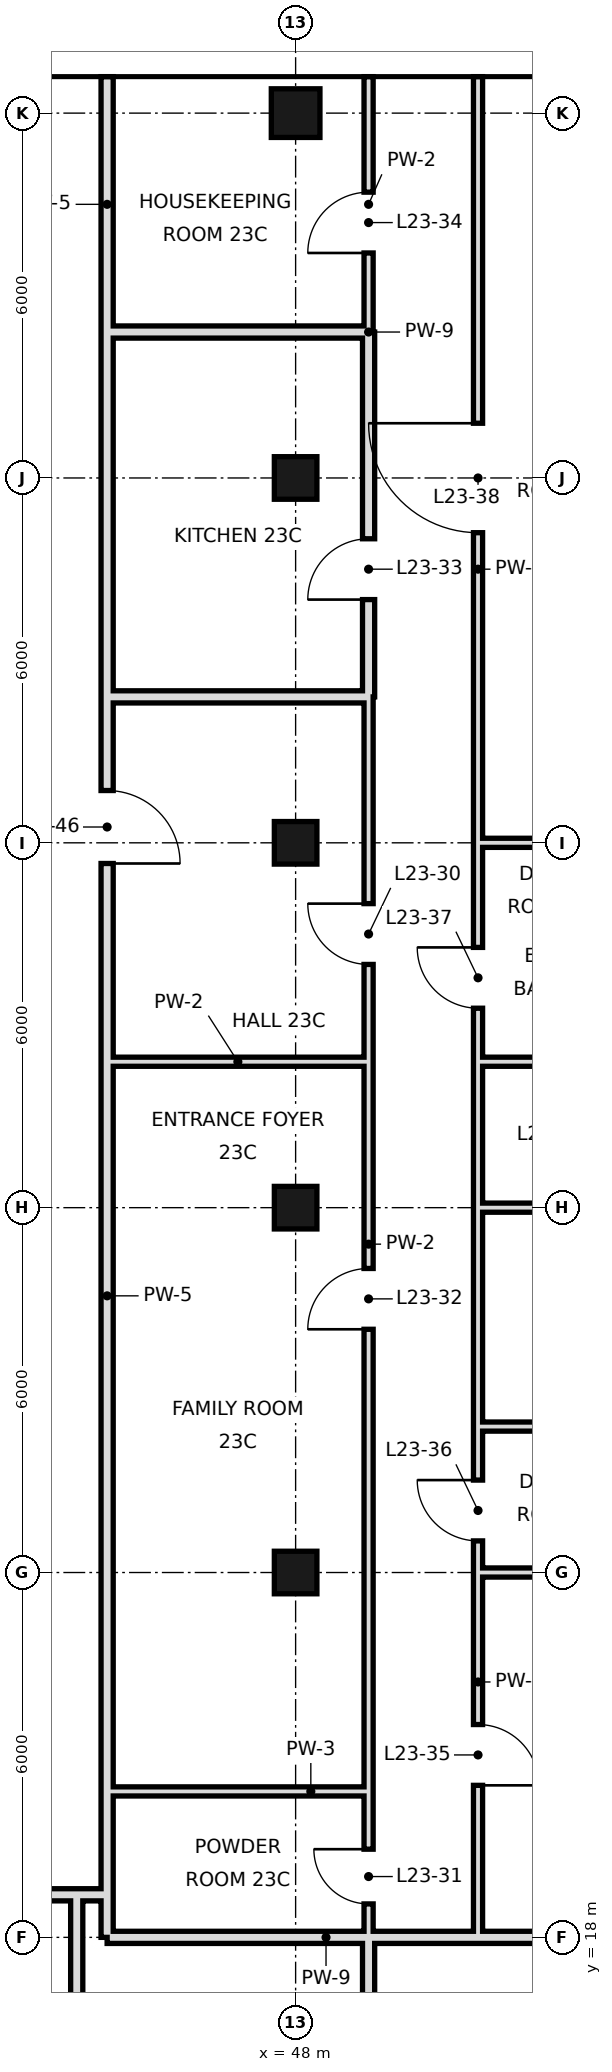
"""IFC4 building model, lengths in metres.
Left out: names, types, materials, properties, quantities, classifications, styles, units other than length and angle.
Written with IfcOpenShell. Run it as: python <this file> out.ifc"""

import sys

from ifc_helpers import new_model, si_unit, direction, frame, frame_2d, origin, origin_2d, place, context, subcontext, project, spatial, rectangle, hollow_rectangle, extrude, element, fill, save


model = new_model("IFC4")
c1 = context("Model", 3, precision=1e-05, world=origin(), true_north=direction((0.0, 1.0)))
c2 = subcontext(c1, "Body", "Model", "MODEL_VIEW")
j1 = project(units=[si_unit("LENGTHUNIT", "METRE"), si_unit("PLANEANGLEUNIT", "RADIAN")], contexts=[c1])
p1 = place(None, origin())
s1 = spatial("IfcSite", under=j1, at=p1, CompositionType="ELEMENT")
p2 = place(p1, origin())
s2 = spatial("IfcBuilding", under=s1, at=p2, CompositionType="ELEMENT")
p3 = place(p2, frame((0.0, 0.0, 107.0)))
s3 = spatial("IfcBuildingStorey", under=s2, at=p3, CompositionType="ELEMENT", Elevation=107.0)
for number, where, z_axis, x_axis in (
    (1, (48.0, 24.0, 0.0), (0.0, 0.0, 1.0), (1.0, 0.0, 0.0)),
    (2, (48.0, 30.0, 0.0), (0.0, 0.0, 1.0), (1.0, 0.0, 0.0)),
    (3, (48.0, 36.0, 0.0), (0.0, 0.0, 1.0), (1.0, 0.0, 0.0)),
    (4, (48.0, 42.0, 0.0), (0.0, 0.0, 1.0), (1.0, 0.0, 0.0)),
):
    element("IfcColumn", number, at=place(p3, frame(where, z_axis=z_axis, x_axis=x_axis)), inside=s3, PredefinedType="COLUMN", context=c2, shape_type="SweptSolid", body=[
        extrude(hollow_rectangle(XDim=0.7, YDim=0.7, WallThickness=0.036, at=origin_2d()), origin(), (0.0, 0.0, 1.0), 3.6),
    ])
p4 = place(p3, frame((48.0, 48.0, 0.0), z_axis=(0.0, 0.0, 1.0), x_axis=(1.0, 0.0, 0.0)))
e5 = element("IfcColumn", 5, at=p4, inside=s3, PredefinedType="COLUMN", context=c2, shape_type="SweptSolid", body=[
    extrude(hollow_rectangle(XDim=0.8, YDim=0.8, WallThickness=0.04, at=origin_2d()), origin(), (0.0, 0.0, 1.0), 3.6),
])
p5 = place(p3, frame((44.4, 10.8, 0.0), z_axis=(0.0, 0.0, 1.0), x_axis=(0.0, 1.0, 0.0)))
e6 = element("IfcWall", 6, at=p5, inside=s3, PredefinedType="SOLIDWALL", context=c2, shape_type="SweptSolid", body=[
    extrude(rectangle(XDim=7.9, YDim=0.2, at=frame_2d((3.95, 0.0))), origin(), (0.0, 0.0, 1.0), 2.72),
])
p6 = place(p3, frame((44.9, 18.7, 0.0), z_axis=(0.0, 0.0, 1.0), x_axis=(0.0, 1.0, 0.0)))
e7 = element("IfcWall", 7, at=p6, inside=s3, PredefinedType="SOLIDWALL", context=c2, shape_type="SweptSolid", body=[
    extrude(rectangle(XDim=19.7, YDim=0.2, at=frame_2d((9.85, 0.0))), origin(), (0.0, 0.0, 1.0), 2.97),
])
p7 = place(p6, frame((16.96, 0.0, 0.0)))
e8 = element("IfcOpeningElement", 8, at=p7, cuts=e7, PredefinedType="OPENING", context=c2, shape_type="SweptSolid", body=[
    extrude(rectangle(XDim=1.2, YDim=2.4, at=frame_2d((0.6, 1.2))), frame((0.0, 0.11, 0.0), z_axis=(0.0, -1.0, 0.0), x_axis=(1.0, 0.0, 0.0)), (0.0, 0.0, 1.0), 0.22),
])
p8 = place(p3, frame((44.9, 44.4, 0.0), z_axis=(0.0, 0.0, 1.0), x_axis=(0.0, 1.0, 0.0)))
e9 = element("IfcWall", 9, at=p8, inside=s3, PredefinedType="SOLIDWALL", context=c2, shape_type="SweptSolid", body=[
    extrude(rectangle(XDim=4.2, YDim=0.2, at=frame_2d((2.1, 0.0))), origin(), (0.0, 0.0, 1.0), 2.72),
])
p9 = place(p3, frame((44.9, 18.0, 0.0), z_axis=(0.0, 0.0, 1.0), x_axis=(0.0, 1.0, 0.0)))
e10 = element("IfcWall", 10, at=p9, inside=s3, PredefinedType="SOLIDWALL", context=c2, shape_type="SweptSolid", body=[
    extrude(rectangle(XDim=0.7, YDim=0.2, at=frame_2d((0.35, 0.0))), origin(), (0.0, 0.0, 1.0), 2.97),
])
p10 = place(p3, frame((44.9, 38.4, 0.0), z_axis=(0.0, 0.0, 1.0), x_axis=(0.0, 1.0, 0.0)))
e11 = element("IfcWall", 11, at=p10, inside=s3, PredefinedType="SOLIDWALL", context=c2, shape_type="SweptSolid", body=[
    extrude(rectangle(XDim=6.0, YDim=0.2, at=frame_2d((3.0, 0.0))), origin(), (0.0, 0.0, 1.0), 2.97),
])
p11 = place(p3, frame((49.2, 10.8, 0.0), z_axis=(0.0, 0.0, 1.0), x_axis=(0.0, 1.0, 0.0)))
e12 = element("IfcWall", 12, at=p11, inside=s3, PredefinedType="SOLIDWALL", context=c2, shape_type="SweptSolid", body=[
    extrude(rectangle(XDim=7.2, YDim=0.2, at=frame_2d((3.6, 0.0))), origin(), (0.0, 0.0, 1.0), 2.72),
])
p12 = place(p3, frame((49.2, 38.4, 0.0), z_axis=(0.0, 0.0, 1.0), x_axis=(0.0, 1.0, 0.0)))
e13 = element("IfcWall", 13, at=p12, inside=s3, PredefinedType="SOLIDWALL", context=c2, shape_type="SweptSolid", body=[
    extrude(rectangle(XDim=6.0, YDim=0.2, at=frame_2d((3.0, 0.0))), origin(), (0.0, 0.0, 1.0), 2.72),
])
p13 = place(p12, frame((1.6, 0.0, 0.0)))
e14 = element("IfcOpeningElement", 14, at=p13, cuts=e13, PredefinedType="OPENING", context=c2, shape_type="SweptSolid", body=[
    extrude(rectangle(XDim=1.0, YDim=2.4, at=frame_2d((0.5, 1.2))), frame((0.0, 0.11, 0.0), z_axis=(0.0, -1.0, 0.0), x_axis=(1.0, 0.0, 0.0)), (0.0, 0.0, 1.0), 0.22),
])
p14 = place(p3, frame((49.2, 20.4, 0.0), z_axis=(0.0, 0.0, 1.0), x_axis=(0.0, 1.0, 0.0)))
e15 = element("IfcWall", 15, at=p14, inside=s3, PredefinedType="PARTITIONING", context=c2, shape_type="SweptSolid", body=[
    extrude(rectangle(XDim=18.0, YDim=0.15, at=frame_2d((9.0, 0.0))), origin(), (0.0, 0.0, 1.0), 3.42),
])
p15 = place(p14, frame((13.6, 0.0, 0.0)))
e16 = element("IfcOpeningElement", 16, at=p15, cuts=e15, PredefinedType="OPENING", context=c2, shape_type="SweptSolid", body=[
    extrude(rectangle(XDim=1.0, YDim=2.4, at=frame_2d((0.5, 1.2))), frame((0.0, 0.085, 0.0), z_axis=(0.0, -1.0, 0.0), x_axis=(1.0, 0.0, 0.0)), (0.0, 0.0, 1.0), 0.17),
])
p16 = place(p14, frame((7.6, 0.0, 0.0)))
e17 = element("IfcOpeningElement", 17, at=p16, cuts=e15, PredefinedType="OPENING", context=c2, shape_type="SweptSolid", body=[
    extrude(rectangle(XDim=1.0, YDim=2.4, at=frame_2d((0.5, 1.2))), frame((0.0, 0.085, 0.0), z_axis=(0.0, -1.0, 0.0), x_axis=(1.0, 0.0, 0.0)), (0.0, 0.0, 1.0), 0.17),
])
p17 = place(p3, frame((49.2, 44.4, 0.0), z_axis=(0.0, 0.0, 1.0), x_axis=(0.0, 1.0, 0.0)))
e18 = element("IfcWall", 18, at=p17, inside=s3, PredefinedType="PARTITIONING", context=c2, shape_type="SweptSolid", body=[
    extrude(rectangle(XDim=4.2, YDim=0.15, at=frame_2d((2.1, 0.0))), origin(), (0.0, 0.0, 1.0), 3.42),
])
p18 = place(p17, frame((1.3, 0.0, 0.0)))
e19 = element("IfcOpeningElement", 19, at=p18, cuts=e18, PredefinedType="OPENING", context=c2, shape_type="SweptSolid", body=[
    extrude(rectangle(XDim=1.0, YDim=2.4, at=frame_2d((0.5, 1.2))), frame((0.0, 0.085, 0.0), z_axis=(0.0, -1.0, 0.0), x_axis=(1.0, 0.0, 0.0)), (0.0, 0.0, 1.0), 0.17),
])
p19 = place(p3, frame((49.2, 18.0, 0.0), z_axis=(0.0, 0.0, 1.0), x_axis=(0.0, 1.0, 0.0)))
e20 = element("IfcWall", 20, at=p19, inside=s3, PredefinedType="PARTITIONING", context=c2, shape_type="SweptSolid", body=[
    extrude(rectangle(XDim=2.4, YDim=0.15, at=frame_2d((1.2, 0.0))), origin(), (0.0, 0.0, 1.0), 3.42),
])
p20 = place(p19, frame((0.55, 0.0, 0.0)))
e21 = element("IfcOpeningElement", 21, at=p20, cuts=e20, PredefinedType="OPENING", context=c2, shape_type="SweptSolid", body=[
    extrude(rectangle(XDim=0.9, YDim=2.4, at=frame_2d((0.45, 1.2))), frame((0.0, 0.085, 0.0), z_axis=(0.0, -1.0, 0.0), x_axis=(1.0, 0.0, 0.0)), (0.0, 0.0, 1.0), 0.17),
])
p21 = place(p3, frame((51.0, 18.0, 0.0), z_axis=(0.0, 0.0, 1.0), x_axis=(0.0, 1.0, 0.0)))
e22 = element("IfcWall", 22, at=p21, inside=s3, PredefinedType="PARTITIONING", context=c2, shape_type="SweptSolid", body=[
    extrude(rectangle(XDim=8.4, YDim=0.15, at=frame_2d((4.2, 0.0))), origin(), (0.0, 0.0, 1.0), 3.42),
])
p22 = place(p21, frame((2.5, 0.0, 0.0)))
e23 = element("IfcOpeningElement", 23, at=p22, cuts=e22, PredefinedType="OPENING", context=c2, shape_type="SweptSolid", body=[
    extrude(rectangle(XDim=1.0, YDim=2.4, at=frame_2d((0.5, 1.2))), frame((0.0, 0.085, 0.0), z_axis=(0.0, -1.0, 0.0), x_axis=(1.0, 0.0, 0.0)), (0.0, 0.0, 1.0), 0.17),
])
p23 = place(p21, frame((6.52, 0.0, 0.0)))
e24 = element("IfcOpeningElement", 24, at=p23, cuts=e22, PredefinedType="OPENING", context=c2, shape_type="SweptSolid", body=[
    extrude(rectangle(XDim=1.0, YDim=2.4, at=frame_2d((0.5, 1.2))), frame((0.0, 0.085, 0.0), z_axis=(0.0, -1.0, 0.0), x_axis=(1.0, 0.0, 0.0)), (0.0, 0.0, 1.0), 0.17),
])
p24 = place(p3, frame((51.0, 32.4, 0.0), z_axis=(0.0, 0.0, 1.0), x_axis=(0.0, 1.0, 0.0)))
e25 = element("IfcWall", 25, at=p24, inside=s3, PredefinedType="PARTITIONING", context=c2, shape_type="SweptSolid", body=[
    extrude(rectangle(XDim=16.2, YDim=0.15, at=frame_2d((8.1, 0.0))), origin(), (0.0, 0.0, 1.0), 3.42),
])
p25 = place(p24, frame((0.88, 0.0, 0.0)))
e26 = element("IfcOpeningElement", 26, at=p25, cuts=e25, PredefinedType="OPENING", context=c2, shape_type="SweptSolid", body=[
    extrude(rectangle(XDim=1.0, YDim=2.4, at=frame_2d((0.5, 1.2))), frame((0.0, 0.085, 0.0), z_axis=(0.0, -1.0, 0.0), x_axis=(1.0, 0.0, 0.0)), (0.0, 0.0, 1.0), 0.17),
])
p26 = place(p24, frame((8.7, 0.0, 0.0)))
e27 = element("IfcOpeningElement", 27, at=p26, cuts=e25, PredefinedType="OPENING", context=c2, shape_type="SweptSolid", body=[
    extrude(rectangle(XDim=1.8, YDim=2.4, at=frame_2d((0.9, 1.2))), frame((0.0, 0.085, 0.0), z_axis=(0.0, -1.0, 0.0), x_axis=(1.0, 0.0, 0.0)), (0.0, 0.0, 1.0), 0.17),
])
p27 = place(p3, frame((51.0, 26.4, 0.0), z_axis=(0.0, 0.0, 1.0), x_axis=(0.0, 1.0, 0.0)))
e28 = element("IfcWall", 28, at=p27, inside=s3, PredefinedType="PARTITIONING", context=c2, shape_type="SweptSolid", body=[
    extrude(rectangle(XDim=6.0, YDim=0.15, at=frame_2d((3.0, 0.0))), origin(), (0.0, 0.0, 1.0), 3.42),
])
p28 = place(p3, frame((44.9, 18.0, 0.0), z_axis=(0.0, 0.0, 1.0), x_axis=(1.0, 0.0, 0.0)))
e29 = element("IfcWall", 29, at=p28, inside=s3, PredefinedType="SOLIDWALL", context=c2, shape_type="SweptSolid", body=[
    extrude(rectangle(XDim=4.3, YDim=0.2, at=frame_2d((2.15, 0.0))), origin(), (0.0, 0.0, 1.0), 2.72),
])
p29 = place(p3, frame((49.2, 18.0, 0.0), z_axis=(0.0, 0.0, 1.0), x_axis=(1.0, 0.0, 0.0)))
e30 = element("IfcWall", 30, at=p29, inside=s3, PredefinedType="SOLIDWALL", context=c2, shape_type="SweptSolid", body=[
    extrude(rectangle(XDim=11.4, YDim=0.2, at=frame_2d((5.7, 0.0))), origin(), (0.0, 0.0, 1.0), 2.72),
])
p30 = place(p3, frame((21.6, 18.7, 0.0), z_axis=(0.0, 0.0, 1.0), x_axis=(1.0, 0.0, 0.0)))
e31 = element("IfcWall", 31, at=p30, inside=s3, PredefinedType="SOLIDWALL", context=c2, shape_type="SweptSolid", body=[
    extrude(rectangle(XDim=22.8, YDim=0.2, at=frame_2d((11.4, 0.0))), origin(), (0.0, 0.0, 1.0), 2.72),
])
p31 = place(p30, frame((4.8, 0.0, 0.0)))
e32 = element("IfcOpeningElement", 32, at=p31, cuts=e31, PredefinedType="OPENING", context=c2, shape_type="SweptSolid", body=[
    extrude(rectangle(XDim=1.2, YDim=2.4, at=frame_2d((0.6, 1.2))), frame((0.0, 0.11, 0.0), z_axis=(0.0, -1.0, 0.0), x_axis=(1.0, 0.0, 0.0)), (0.0, 0.0, 1.0), 0.22),
])
p32 = place(p30, frame((16.8, 0.0, 0.0)))
e33 = element("IfcOpeningElement", 33, at=p32, cuts=e31, PredefinedType="OPENING", context=c2, shape_type="SweptSolid", body=[
    extrude(rectangle(XDim=1.2, YDim=2.4, at=frame_2d((0.6, 1.2))), frame((0.0, 0.11, 0.0), z_axis=(0.0, -1.0, 0.0), x_axis=(1.0, 0.0, 0.0)), (0.0, 0.0, 1.0), 0.22),
])
p33 = place(p3, frame((44.4, 18.7, 0.0), z_axis=(0.0, 0.0, 1.0), x_axis=(1.0, 0.0, 0.0)))
e34 = element("IfcWall", 34, at=p33, inside=s3, PredefinedType="SOLIDWALL", context=c2, shape_type="SweptSolid", body=[
    extrude(rectangle(XDim=0.5, YDim=0.2, at=frame_2d((0.25, 0.0))), origin(), (0.0, 0.0, 1.0), 3.42),
])
p34 = place(p3, frame((44.9, 20.4, 0.0), z_axis=(0.0, 0.0, 1.0), x_axis=(1.0, 0.0, 0.0)))
e35 = element("IfcWall", 35, at=p34, inside=s3, PredefinedType="PARTITIONING", context=c2, shape_type="SweptSolid", body=[
    extrude(rectangle(XDim=4.3, YDim=0.15, at=frame_2d((2.15, 0.0))), origin(), (0.0, 0.0, 1.0), 3.42),
])
p35 = place(p3, frame((51.0, 24.0, 0.0), z_axis=(0.0, 0.0, 1.0), x_axis=(1.0, 0.0, 0.0)))
e36 = element("IfcWall", 36, at=p35, inside=s3, PredefinedType="PARTITIONING", context=c2, shape_type="SweptSolid", body=[
    extrude(rectangle(XDim=9.0, YDim=0.15, at=frame_2d((4.5, 0.0))), origin(), (0.0, 0.0, 1.0), 2.72),
])
p36 = place(p3, frame((51.0, 26.4, 0.0), z_axis=(0.0, 0.0, 1.0), x_axis=(1.0, 0.0, 0.0)))
e37 = element("IfcWall", 37, at=p36, inside=s3, PredefinedType="PARTITIONING", context=c2, shape_type="SweptSolid", body=[
    extrude(rectangle(XDim=3.0, YDim=0.15, at=frame_2d((1.5, 0.0))), origin(), (0.0, 0.0, 1.0), 3.42),
])
p37 = place(p3, frame((51.0, 30.0, 0.0), z_axis=(0.0, 0.0, 1.0), x_axis=(1.0, 0.0, 0.0)))
e38 = element("IfcWall", 38, at=p37, inside=s3, PredefinedType="PARTITIONING", context=c2, shape_type="SweptSolid", body=[
    extrude(rectangle(XDim=3.0, YDim=0.15, at=frame_2d((1.5, 0.0))), origin(), (0.0, 0.0, 1.0), 2.72),
])
p38 = place(p3, frame((44.9, 32.4, 0.0), z_axis=(0.0, 0.0, 1.0), x_axis=(1.0, 0.0, 0.0)))
e39 = element("IfcWall", 39, at=p38, inside=s3, PredefinedType="PARTITIONING", context=c2, shape_type="SweptSolid", body=[
    extrude(rectangle(XDim=4.3, YDim=0.15, at=frame_2d((2.15, 0.0))), origin(), (0.0, 0.0, 1.0), 3.42),
])
p39 = place(p3, frame((51.0, 32.4, 0.0), z_axis=(0.0, 0.0, 1.0), x_axis=(1.0, 0.0, 0.0)))
e40 = element("IfcWall", 40, at=p39, inside=s3, PredefinedType="PARTITIONING", context=c2, shape_type="SweptSolid", body=[
    extrude(rectangle(XDim=3.0, YDim=0.15, at=frame_2d((1.5, 0.0))), origin(), (0.0, 0.0, 1.0), 3.42),
])
p40 = place(p3, frame((51.0, 36.0, 0.0), z_axis=(0.0, 0.0, 1.0), x_axis=(1.0, 0.0, 0.0)))
e41 = element("IfcWall", 41, at=p40, inside=s3, PredefinedType="PARTITIONING", context=c2, shape_type="SweptSolid", body=[
    extrude(rectangle(XDim=9.0, YDim=0.15, at=frame_2d((4.5, 0.0))), origin(), (0.0, 0.0, 1.0), 2.72),
])
for number, where, z_axis, x_axis in (
    (42, (44.9, 38.4, 0.0), (0.0, 0.0, 1.0), (1.0, 0.0, 0.0)),
    (43, (44.9, 44.4, 0.0), (0.0, 0.0, 1.0), (1.0, 0.0, 0.0)),
):
    element("IfcWall", number, at=place(p3, frame(where, z_axis=z_axis, x_axis=x_axis)), inside=s3, PredefinedType="SOLIDWALL", context=c2, shape_type="SweptSolid", body=[
        extrude(rectangle(XDim=4.3, YDim=0.2, at=frame_2d((2.15, 0.0))), origin(), (0.0, 0.0, 1.0), 2.97),
    ])
p41 = place(p15, frame((1.0, 0.0, 0.0), z_axis=(0.0, 0.0, 1.0), x_axis=(-1.0, 0.0, 0.0)))
e44 = element("IfcDoor", 44, at=p41, inside=s3, OperationType="SINGLE_SWING_LEFT", PredefinedType="DOOR", context=c2, shape_type="SweptSolid", body=[
    extrude(rectangle(XDim=1.0, YDim=2.4, at=frame_2d((0.5, 1.2))), frame((0.0, 0.025, 0.0), z_axis=(0.0, -1.0, 0.0), x_axis=(1.0, 0.0, 0.0)), (0.0, 0.0, 1.0), 0.05),
])
fill(e16, e44)
p42 = place(p20, frame((0.9, 0.0, 0.0), z_axis=(0.0, 0.0, 1.0), x_axis=(-1.0, 0.0, 0.0)))
e45 = element("IfcDoor", 45, at=p42, inside=s3, OperationType="SINGLE_SWING_LEFT", PredefinedType="DOOR", context=c2, shape_type="SweptSolid", body=[
    extrude(rectangle(XDim=0.9, YDim=2.4, at=frame_2d((0.45, 1.2))), frame((0.0, 0.025, 0.0), z_axis=(0.0, -1.0, 0.0), x_axis=(1.0, 0.0, 0.0)), (0.0, 0.0, 1.0), 0.05),
])
fill(e21, e45)
p43 = place(p16, origin())
e46 = element("IfcDoor", 46, at=p43, inside=s3, OperationType="SINGLE_SWING_LEFT", PredefinedType="DOOR", context=c2, shape_type="SweptSolid", body=[
    extrude(rectangle(XDim=1.0, YDim=2.4, at=frame_2d((0.5, 1.2))), frame((0.0, 0.025, 0.0), z_axis=(0.0, -1.0, 0.0), x_axis=(1.0, 0.0, 0.0)), (0.0, 0.0, 1.0), 0.05),
])
fill(e17, e46)
p44 = place(p13, origin())
e47 = element("IfcDoor", 47, at=p44, inside=s3, OperationType="SINGLE_SWING_LEFT", PredefinedType="DOOR", context=c2, shape_type="SweptSolid", body=[
    extrude(rectangle(XDim=1.0, YDim=2.4, at=frame_2d((0.5, 1.2))), frame((0.0, 0.025, 0.0), z_axis=(0.0, -1.0, 0.0), x_axis=(1.0, 0.0, 0.0)), (0.0, 0.0, 1.0), 0.05),
])
fill(e14, e47)
p45 = place(p18, origin())
e48 = element("IfcDoor", 48, at=p45, inside=s3, OperationType="SINGLE_SWING_LEFT", PredefinedType="DOOR", context=c2, shape_type="SweptSolid", body=[
    extrude(rectangle(XDim=1.0, YDim=2.4, at=frame_2d((0.5, 1.2))), frame((0.0, 0.025, 0.0), z_axis=(0.0, -1.0, 0.0), x_axis=(1.0, 0.0, 0.0)), (0.0, 0.0, 1.0), 0.05),
])
fill(e19, e48)
p46 = place(p22, frame((1.0, 0.0, 0.0), z_axis=(0.0, 0.0, 1.0), x_axis=(-1.0, 0.0, 0.0)))
e49 = element("IfcDoor", 49, at=p46, inside=s3, OperationType="SINGLE_SWING_RIGHT", PredefinedType="DOOR", context=c2, shape_type="SweptSolid", body=[
    extrude(rectangle(XDim=1.0, YDim=2.4, at=frame_2d((0.5, 1.2))), frame((0.0, 0.025, 0.0), z_axis=(0.0, -1.0, 0.0), x_axis=(1.0, 0.0, 0.0)), (0.0, 0.0, 1.0), 0.05),
])
fill(e23, e49)
p47 = place(p23, frame((1.0, 0.0, 0.0), z_axis=(0.0, 0.0, 1.0), x_axis=(-1.0, 0.0, 0.0)))
e50 = element("IfcDoor", 50, at=p47, inside=s3, OperationType="SINGLE_SWING_LEFT", PredefinedType="DOOR", context=c2, shape_type="SweptSolid", body=[
    extrude(rectangle(XDim=1.0, YDim=2.4, at=frame_2d((0.5, 1.2))), frame((0.0, 0.025, 0.0), z_axis=(0.0, -1.0, 0.0), x_axis=(1.0, 0.0, 0.0)), (0.0, 0.0, 1.0), 0.05),
])
fill(e24, e50)
p48 = place(p25, frame((1.0, 0.0, 0.0), z_axis=(0.0, 0.0, 1.0), x_axis=(-1.0, 0.0, 0.0)))
e51 = element("IfcDoor", 51, at=p48, inside=s3, OperationType="SINGLE_SWING_LEFT", PredefinedType="DOOR", context=c2, shape_type="SweptSolid", body=[
    extrude(rectangle(XDim=1.0, YDim=2.4, at=frame_2d((0.5, 1.2))), frame((0.0, 0.025, 0.0), z_axis=(0.0, -1.0, 0.0), x_axis=(1.0, 0.0, 0.0)), (0.0, 0.0, 1.0), 0.05),
])
fill(e26, e51)
p49 = place(p26, frame((1.8, 0.0, 0.0), z_axis=(0.0, 0.0, 1.0), x_axis=(-1.0, 0.0, 0.0)))
e52 = element("IfcDoor", 52, at=p49, inside=s3, OperationType="SINGLE_SWING_LEFT", PredefinedType="DOOR", context=c2, shape_type="SweptSolid", body=[
    extrude(rectangle(XDim=1.8, YDim=2.4, at=frame_2d((0.9, 1.2))), frame((0.0, 0.025, 0.0), z_axis=(0.0, -1.0, 0.0), x_axis=(1.0, 0.0, 0.0)), (0.0, 0.0, 1.0), 0.05),
])
fill(e27, e52)
p50 = place(p7, frame((1.2, 0.0, 0.0), z_axis=(0.0, 0.0, 1.0), x_axis=(-1.0, 0.0, 0.0)))
e53 = element("IfcDoor", 53, at=p50, inside=s3, OperationType="SINGLE_SWING_RIGHT", PredefinedType="DOOR", context=c2, shape_type="SweptSolid", body=[
    extrude(rectangle(XDim=1.2, YDim=2.4, at=frame_2d((0.6, 1.2))), frame((0.0, 0.025, 0.0), z_axis=(0.0, -1.0, 0.0), x_axis=(1.0, 0.0, 0.0)), (0.0, 0.0, 1.0), 0.05),
])
fill(e8, e53)
save(model, sys.argv[1])
